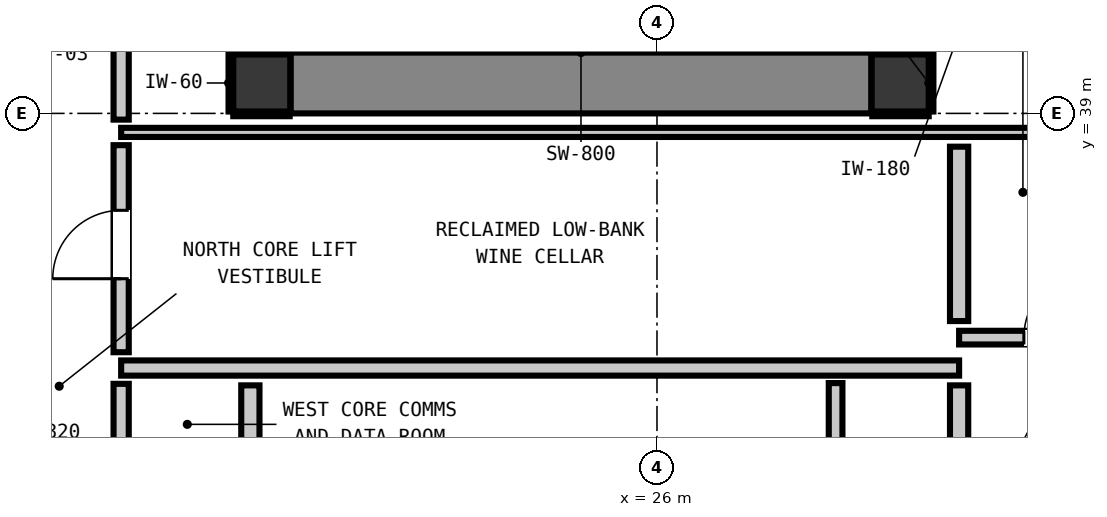
"""IFC4 building model, lengths in metres.
Left out: names, types, materials, properties, quantities, classifications, styles, units other than length and angle.
Written with IfcOpenShell. Run it as: python <this file> out.ifc"""

import sys

from ifc_helpers import new_model, si_unit, direction, frame, frame_2d, origin, origin_2d, place, context, subcontext, project, spatial, rectangle, extrude, element, fill, save


model = new_model("IFC4")
c1 = context("Model", 3, precision=1e-05, world=origin(), true_north=direction((0.0, 1.0)))
c2 = subcontext(c1, "Body", "Model", "MODEL_VIEW")
j1 = project(units=[si_unit("LENGTHUNIT", "METRE"), si_unit("PLANEANGLEUNIT", "RADIAN")], contexts=[c1])
p1 = place(None, origin())
s1 = spatial("IfcSite", under=j1, at=p1, CompositionType="ELEMENT")
p2 = place(p1, origin())
s2 = spatial("IfcBuilding", under=s1, at=p2, CompositionType="ELEMENT")
p3 = place(p2, frame((0.0, 0.0, 206.76)))
s3 = spatial("IfcBuildingStorey", under=s2, at=p3, CompositionType="ELEMENT", Elevation=206.76)
for number, where, z_axis, x_axis in (
    (1, (20.8, 39.4, 0.0), (0.0, 0.0, 1.0), (1.0, 0.0, 0.0)),
    (2, (29.2, 39.4, 0.0), (0.0, 0.0, 1.0), (1.0, 0.0, 0.0)),
):
    element("IfcColumn", number, at=place(p3, frame(where, z_axis=z_axis, x_axis=x_axis)), inside=s3, PredefinedType="COLUMN", context=c2, shape_type="SweptSolid", body=[
        extrude(rectangle(XDim=0.75, YDim=0.75, at=origin_2d()), origin(), (0.0, 0.0, 1.0), 3.32),
    ])
p4 = place(p3, frame((21.18, 39.4, 0.0), z_axis=(0.0, 0.0, 1.0), x_axis=(1.0, 0.0, 0.0)))
e3 = element("IfcWall", 3, at=p4, inside=s3, PredefinedType="SHEAR", context=c2, shape_type="SweptSolid", body=[
    extrude(rectangle(XDim=7.64, YDim=0.8, at=frame_2d((3.82, 0.0))), origin(), (0.0, 0.0, 1.0), 3.32),
])
p5 = place(p3, frame((18.95, 35.65, 0.0), z_axis=(0.0, 0.0, 1.0), x_axis=(1.0, 0.0, 0.0)))
e4 = element("IfcWall", 4, at=p5, inside=s3, PredefinedType="PARTITIONING", context=c2, shape_type="SweptSolid", body=[
    extrude(rectangle(XDim=11.025, YDim=0.2, at=frame_2d((5.513, 0.0))), origin(), (0.0, 0.0, 1.0), 2.9),
])
p6 = place(p3, frame((29.975, 36.05, 0.0), z_axis=(0.0, 0.0, 1.0), x_axis=(1.0, 0.0, 0.0)))
e5 = element("IfcWall", 5, at=p6, inside=s3, PredefinedType="PARTITIONING", context=c2, shape_type="SweptSolid", body=[
    extrude(rectangle(XDim=2.505, YDim=0.18, at=frame_2d((1.252, 0.0))), origin(), (0.0, 0.0, 1.0), 2.9),
])
p7 = place(p6, frame((0.852, 0.0, 0.0)))
e6 = element("IfcOpeningElement", 6, at=p7, cuts=e5, PredefinedType="OPENING", context=c2, shape_type="SweptSolid", body=[
    extrude(rectangle(XDim=0.9, YDim=2.1, at=frame_2d((0.45, 1.05))), frame((0.0, 0.1, 0.0), z_axis=(0.0, -1.0, 0.0), x_axis=(1.0, 0.0, 0.0)), (0.0, 0.0, 1.0), 0.2),
])
p8 = place(p3, frame((18.95, 38.75, 0.0), z_axis=(0.0, 0.0, 1.0), x_axis=(1.0, 0.0, 0.0)))
e7 = element("IfcWall", 7, at=p8, inside=s3, PredefinedType="PARTITIONING", context=c2, shape_type="SweptSolid", body=[
    extrude(rectangle(XDim=13.56, YDim=0.12, at=frame_2d((6.78, 0.0))), origin(), (0.0, 0.0, 1.0), 0.905),
])
p9 = place(p3, frame((20.65, 33.148, 0.0), z_axis=(0.0, 0.0, 1.0), x_axis=(0.0, 1.0, 0.0)))
e8 = element("IfcWall", 8, at=p9, inside=s3, PredefinedType="PARTITIONING", context=c2, shape_type="SweptSolid", body=[
    extrude(rectangle(XDim=2.274, YDim=0.24, at=frame_2d((1.137, 0.0))), origin(), (0.0, 0.0, 1.0), 0.905),
])
p10 = place(p3, frame((29.975, 34.498, 0.0), z_axis=(0.0, 0.0, 1.0), x_axis=(0.0, 1.0, 0.0)))
e9 = element("IfcWall", 9, at=p10, inside=s3, PredefinedType="PARTITIONING", context=c2, shape_type="SweptSolid", body=[
    extrude(rectangle(XDim=0.924, YDim=0.24, at=frame_2d((0.462, 0.0))), origin(), (0.0, 0.0, 1.0), 2.9),
])
p11 = place(p3, frame((29.975, 36.268, 0.0), z_axis=(0.0, 0.0, 1.0), x_axis=(0.0, 1.0, 0.0)))
e10 = element("IfcWall", 10, at=p11, inside=s3, PredefinedType="PARTITIONING", context=c2, shape_type="SweptSolid", body=[
    extrude(rectangle(XDim=2.294, YDim=0.24, at=frame_2d((1.147, 0.0))), origin(), (0.0, 0.0, 1.0), 2.9),
])
p12 = place(p3, frame((18.95, 33.128, 0.0), z_axis=(0.0, 0.0, 1.0), x_axis=(0.0, 1.0, 0.0)))
e11 = element("IfcWall", 11, at=p12, inside=s3, PredefinedType="PARTITIONING", context=c2, shape_type="SweptSolid", body=[
    extrude(rectangle(XDim=2.314, YDim=0.2, at=frame_2d((1.157, 0.0))), origin(), (0.0, 0.0, 1.0), 2.9),
])
p13 = place(p3, frame((18.95, 35.858, 0.0), z_axis=(0.0, 0.0, 1.0), x_axis=(0.0, 1.0, 0.0)))
e12 = element("IfcWall", 12, at=p13, inside=s3, PredefinedType="PARTITIONING", context=c2, shape_type="SweptSolid", body=[
    extrude(rectangle(XDim=2.724, YDim=0.2, at=frame_2d((1.362, 0.0))), origin(), (0.0, 0.0, 1.0), 2.9),
])
p14 = place(p13, frame((0.967, 0.0, 0.0)))
e13 = element("IfcOpeningElement", 13, at=p14, cuts=e12, PredefinedType="OPENING", context=c2, shape_type="SweptSolid", body=[
    extrude(rectangle(XDim=0.9, YDim=2.1, at=frame_2d((0.45, 1.05))), frame((0.0, 0.11, 0.0), z_axis=(0.0, -1.0, 0.0), x_axis=(1.0, 0.0, 0.0)), (0.0, 0.0, 1.0), 0.22),
])
p15 = place(p3, frame((18.95, 38.918, 0.0), z_axis=(0.0, 0.0, 1.0), x_axis=(0.0, 1.0, 0.0)))
e14 = element("IfcWall", 14, at=p15, inside=s3, PredefinedType="PARTITIONING", context=c2, shape_type="SweptSolid", body=[
    extrude(rectangle(XDim=1.134, YDim=0.2, at=frame_2d((0.567, 0.0))), origin(), (0.0, 0.0, 1.0), 2.9),
])
p16 = place(p3, frame((28.35, 31.838, 0.0), z_axis=(0.0, 0.0, 1.0), x_axis=(0.0, 1.0, 0.0)))
e15 = element("IfcWall", 15, at=p16, inside=s3, PredefinedType="PARTITIONING", context=c2, shape_type="SweptSolid", body=[
    extrude(rectangle(XDim=3.614, YDim=0.18, at=frame_2d((1.807, 0.0))), origin(), (0.0, 0.0, 1.0), 2.9),
])
for number, where, z_axis, x_axis in (
    (16, (20.425, 38.993, 0.0), (0.0, 0.0, 1.0), (1.0, 0.0, 0.0)),
    (17, (20.425, 39.807, 0.0), (0.0, 0.0, 1.0), (1.0, 0.0, 0.0)),
):
    element("IfcWall", number, at=place(p3, frame(where, z_axis=z_axis, x_axis=x_axis)), inside=s3, PredefinedType="PARTITIONING", context=c2, shape_type="SweptSolid", body=[
        extrude(rectangle(XDim=0.742, YDim=0.06, at=frame_2d((0.371, 0.0))), origin(), (0.0, 0.0, 1.0), 0.905),
    ])
p17 = place(p3, frame((20.393, 39.025, 0.0), z_axis=(0.0, 0.0, 1.0), x_axis=(0.0, 1.0, 0.0)))
e18 = element("IfcWall", 18, at=p17, inside=s3, PredefinedType="PARTITIONING", context=c2, shape_type="SweptSolid", body=[
    extrude(rectangle(XDim=0.75, YDim=0.06, at=frame_2d((0.375, 0.0))), origin(), (0.0, 0.0, 1.0), 0.905),
])
for number, where, z_axis, x_axis in (
    (19, (28.833, 38.993, 0.0), (0.0, 0.0, 1.0), (1.0, 0.0, 0.0)),
    (20, (28.833, 39.807, 0.0), (0.0, 0.0, 1.0), (1.0, 0.0, 0.0)),
):
    element("IfcWall", number, at=place(p3, frame(where, z_axis=z_axis, x_axis=x_axis)), inside=s3, PredefinedType="PARTITIONING", context=c2, shape_type="SweptSolid", body=[
        extrude(rectangle(XDim=0.742, YDim=0.06, at=frame_2d((0.371, 0.0))), origin(), (0.0, 0.0, 1.0), 0.905),
    ])
p18 = place(p3, frame((29.607, 39.025, 0.0), z_axis=(0.0, 0.0, 1.0), x_axis=(0.0, 1.0, 0.0)))
e21 = element("IfcWall", 21, at=p18, inside=s3, PredefinedType="PARTITIONING", context=c2, shape_type="SweptSolid", body=[
    extrude(rectangle(XDim=0.75, YDim=0.06, at=frame_2d((0.375, 0.0))), origin(), (0.0, 0.0, 1.0), 0.905),
])
p19 = place(p7, origin())
e22 = element("IfcDoor", 22, at=p19, inside=s3, OperationType="SINGLE_SWING_RIGHT", PredefinedType="DOOR", context=c2, shape_type="SweptSolid", body=[
    extrude(rectangle(XDim=0.9, YDim=2.1, at=frame_2d((0.45, 1.05))), frame((0.0, 0.025, 0.0), z_axis=(0.0, -1.0, 0.0), x_axis=(1.0, 0.0, 0.0)), (0.0, 0.0, 1.0), 0.05),
])
fill(e6, e22)
p20 = place(p14, origin())
e23 = element("IfcDoor", 23, at=p20, inside=s3, OperationType="SINGLE_SWING_LEFT", PredefinedType="DOOR", context=c2, shape_type="SweptSolid", body=[
    extrude(rectangle(XDim=0.9, YDim=2.1, at=frame_2d((0.45, 1.05))), frame((0.0, 0.025, 0.0), z_axis=(0.0, -1.0, 0.0), x_axis=(1.0, 0.0, 0.0)), (0.0, 0.0, 1.0), 0.05),
])
fill(e13, e23)
save(model, sys.argv[1])
